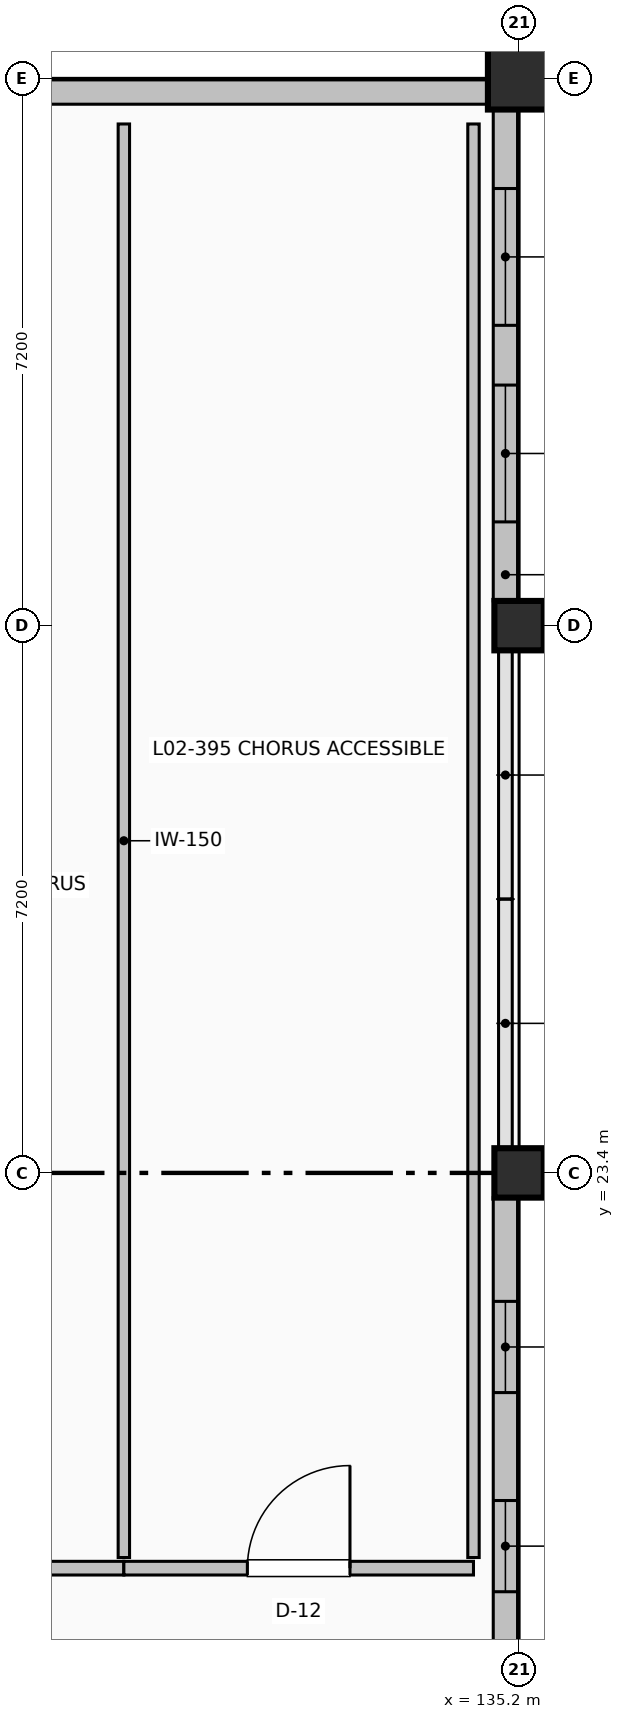
"""IFC4 building model, lengths in metres.
Left out: names, types, materials, properties, quantities, classifications, styles, units other than length and angle.
Written with IfcOpenShell. Run it as: python <this file> out.ifc"""

import sys

from ifc_helpers import new_model, si_unit, direction, frame, frame_2d, origin, origin_2d, place, context, subcontext, project, spatial, rectangle, extrude, element, fill, save


model = new_model("IFC4")
c1 = context("Model", 3, precision=1e-05, world=origin(), true_north=direction((0.0, 1.0)))
c2 = subcontext(c1, "Body", "Model", "MODEL_VIEW")
j1 = project(units=[si_unit("LENGTHUNIT", "METRE"), si_unit("PLANEANGLEUNIT", "RADIAN")], contexts=[c1])
p1 = place(None, origin())
s1 = spatial("IfcSite", under=j1, at=p1, CompositionType="ELEMENT")
p2 = place(p1, origin())
s2 = spatial("IfcBuilding", under=s1, at=p2, CompositionType="ELEMENT")
p3 = place(p2, frame((0.0, 0.0, 10.2)))
s3 = spatial("IfcBuildingStorey", under=s2, at=p3, CompositionType="ELEMENT", Elevation=10.2)
for number, where, z_axis, x_axis in (
    (1, (135.2, 23.4, 0.0), (0.0, 0.0, 1.0), (1.0, 0.0, 0.0)),
    (2, (135.2, 30.6, 0.0), (0.0, 0.0, 1.0), (1.0, 0.0, 0.0)),
):
    element("IfcColumn", number, at=place(p3, frame(where, z_axis=z_axis, x_axis=x_axis)), inside=s3, PredefinedType="COLUMN", context=c2, shape_type="SweptSolid", body=[
        extrude(rectangle(XDim=0.65, YDim=0.65, at=origin_2d()), origin(), (0.0, 0.0, 1.0), 4.8),
    ])
p4 = place(p3, frame((135.2, 37.8, 0.0), z_axis=(0.0, 0.0, 1.0), x_axis=(1.0, 0.0, 0.0)))
e3 = element("IfcColumn", 3, at=p4, inside=s3, PredefinedType="COLUMN", context=c2, shape_type="SweptSolid", body=[
    extrude(rectangle(XDim=0.82, YDim=0.82, at=origin_2d()), origin(), (0.0, 0.0, 1.0), 4.8),
])
p5 = place(p3, frame((135.02, 37.39, 0.0), z_axis=(0.0, 0.0, 1.0), x_axis=(0.0, -1.0, 0.0)))
e4 = element("IfcWall", 4, at=p5, inside=s3, PredefinedType="SOLIDWALL", context=c2, shape_type="SweptSolid", body=[
    extrude(rectangle(XDim=6.465, YDim=0.32, at=frame_2d((3.232, 0.0))), origin(), (0.0, 0.0, 1.0), 3.742),
])
p6 = place(p5, frame((1.039, 0.0, 1.0)))
e5 = element("IfcOpeningElement", 5, at=p6, cuts=e4, PredefinedType="OPENING", context=c2, shape_type="SweptSolid", body=[
    extrude(rectangle(XDim=1.8, YDim=1.7, at=frame_2d((0.9, 0.85))), frame((0.0, 0.17, 0.0), z_axis=(0.0, -1.0, 0.0), x_axis=(1.0, 0.0, 0.0)), (0.0, 0.0, 1.0), 0.34),
])
p7 = place(p5, frame((3.625, 0.0, 1.0)))
e6 = element("IfcOpeningElement", 6, at=p7, cuts=e4, PredefinedType="OPENING", context=c2, shape_type="SweptSolid", body=[
    extrude(rectangle(XDim=1.8, YDim=1.7, at=frame_2d((0.9, 0.85))), frame((0.0, 0.17, 0.0), z_axis=(0.0, -1.0, 0.0), x_axis=(1.0, 0.0, 0.0)), (0.0, 0.0, 1.0), 0.34),
])
p8 = place(p3, frame((135.02, 23.075, 0.0), z_axis=(0.0, 0.0, 1.0), x_axis=(0.0, -1.0, 0.0)))
e7 = element("IfcWall", 7, at=p8, inside=s3, PredefinedType="SOLIDWALL", context=c2, shape_type="SweptSolid", body=[
    extrude(rectangle(XDim=6.55, YDim=0.32, at=frame_2d((3.275, 0.0))), origin(), (0.0, 0.0, 1.0), 3.742),
])
p9 = place(p8, frame((1.365, 0.0, 1.0)))
e8 = element("IfcOpeningElement", 8, at=p9, cuts=e7, PredefinedType="OPENING", context=c2, shape_type="SweptSolid", body=[
    extrude(rectangle(XDim=1.2, YDim=1.7, at=frame_2d((0.6, 0.85))), frame((0.0, 0.17, 0.0), z_axis=(0.0, -1.0, 0.0), x_axis=(1.0, 0.0, 0.0)), (0.0, 0.0, 1.0), 0.34),
])
p10 = place(p8, frame((3.985, 0.0, 1.0)))
e9 = element("IfcOpeningElement", 9, at=p10, cuts=e7, PredefinedType="OPENING", context=c2, shape_type="SweptSolid", body=[
    extrude(rectangle(XDim=1.2, YDim=1.7, at=frame_2d((0.6, 0.85))), frame((0.0, 0.17, 0.0), z_axis=(0.0, -1.0, 0.0), x_axis=(1.0, 0.0, 0.0)), (0.0, 0.0, 1.0), 0.34),
])
p11 = place(p3, frame((129.01, 37.62, 0.0), z_axis=(0.0, 0.0, 1.0), x_axis=(1.0, 0.0, 0.0)))
e10 = element("IfcWall", 10, at=p11, inside=s3, PredefinedType="SOLIDWALL", context=c2, shape_type="SweptSolid", body=[
    extrude(rectangle(XDim=5.78, YDim=0.32, at=frame_2d((2.89, 0.0))), origin(), (0.0, 0.0, 1.0), 3.742),
])
p12 = place(p3, frame((125.4, 18.2, 0.0), z_axis=(0.0, 0.0, 1.0), x_axis=(1.0, 0.0, 0.0)))
e11 = element("IfcWall", 11, at=p12, inside=s3, PredefinedType="PARTITIONING", context=c2, shape_type="SweptSolid", body=[
    extrude(rectangle(XDim=4.6, YDim=0.18, at=frame_2d((2.3, 0.0))), origin(), (0.0, 0.0, 1.0), 4.492),
])
p13 = place(p12, frame((1.7, 0.0, 0.0)))
e12 = element("IfcOpeningElement", 12, at=p13, cuts=e11, PredefinedType="OPENING", context=c2, shape_type="SweptSolid", body=[
    extrude(rectangle(XDim=1.2, YDim=2.1, at=frame_2d((0.6, 1.05))), frame((0.0, 0.1, 0.0), z_axis=(0.0, -1.0, 0.0), x_axis=(1.0, 0.0, 0.0)), (0.0, 0.0, 1.0), 0.2),
])
for number, where, z_axis, x_axis in (
    (13, (130.0, 18.34, 0.0), (0.0, 0.0, 1.0), (0.0, 1.0, 0.0)),
    (14, (134.6, 18.34, 0.0), (0.0, 0.0, 1.0), (0.0, 1.0, 0.0)),
):
    element("IfcWall", number, at=place(p3, frame(where, z_axis=z_axis, x_axis=x_axis)), inside=s3, PredefinedType="PARTITIONING", context=c2, shape_type="SweptSolid", body=[
        extrude(rectangle(XDim=18.86, YDim=0.15, at=frame_2d((9.43, 0.0))), origin(), (0.0, 0.0, 1.0), 4.492),
    ])
p14 = place(p3, frame((130.0, 18.2, 0.0), z_axis=(0.0, 0.0, 1.0), x_axis=(1.0, 0.0, 0.0)))
e15 = element("IfcWall", 15, at=p14, inside=s3, PredefinedType="PARTITIONING", context=c2, shape_type="SweptSolid", body=[
    extrude(rectangle(XDim=4.6, YDim=0.18, at=frame_2d((2.3, 0.0))), origin(), (0.0, 0.0, 1.0), 4.492),
])
p15 = place(p14, frame((1.625, 0.0, 0.0)))
e16 = element("IfcOpeningElement", 16, at=p15, cuts=e15, PredefinedType="OPENING", context=c2, shape_type="SweptSolid", body=[
    extrude(rectangle(XDim=1.35, YDim=2.16, at=frame_2d((0.675, 1.08))), frame((0.0, 0.1, 0.0), z_axis=(0.0, -1.0, 0.0), x_axis=(1.0, 0.0, 0.0)), (0.0, 0.0, 1.0), 0.2),
])
p16 = place(p6, origin())
e17 = element("IfcWindow", 17, at=p16, inside=s3, PartitioningType="SINGLE_PANEL", PredefinedType="WINDOW", context=c2, shape_type="SweptSolid", body=[
    extrude(rectangle(XDim=1.8, YDim=1.7, at=frame_2d((0.9, 0.85))), frame((0.0, 0.03, 0.0), z_axis=(0.0, -1.0, 0.0), x_axis=(1.0, 0.0, 0.0)), (0.0, 0.0, 1.0), 0.06),
])
fill(e5, e17)
p17 = place(p7, origin())
e18 = element("IfcWindow", 18, at=p17, inside=s3, PartitioningType="SINGLE_PANEL", PredefinedType="WINDOW", context=c2, shape_type="SweptSolid", body=[
    extrude(rectangle(XDim=1.8, YDim=1.7, at=frame_2d((0.9, 0.85))), frame((0.0, 0.03, 0.0), z_axis=(0.0, -1.0, 0.0), x_axis=(1.0, 0.0, 0.0)), (0.0, 0.0, 1.0), 0.06),
])
fill(e6, e18)
p18 = place(p9, origin())
e19 = element("IfcWindow", 19, at=p18, inside=s3, PartitioningType="SINGLE_PANEL", PredefinedType="WINDOW", context=c2, shape_type="SweptSolid", body=[
    extrude(rectangle(XDim=1.2, YDim=1.7, at=frame_2d((0.6, 0.85))), frame((0.0, 0.03, 0.0), z_axis=(0.0, -1.0, 0.0), x_axis=(1.0, 0.0, 0.0)), (0.0, 0.0, 1.0), 0.06),
])
fill(e8, e19)
p19 = place(p10, origin())
e20 = element("IfcWindow", 20, at=p19, inside=s3, PartitioningType="SINGLE_PANEL", PredefinedType="WINDOW", context=c2, shape_type="SweptSolid", body=[
    extrude(rectangle(XDim=1.2, YDim=1.7, at=frame_2d((0.6, 0.85))), frame((0.0, 0.03, 0.0), z_axis=(0.0, -1.0, 0.0), x_axis=(1.0, 0.0, 0.0)), (0.0, 0.0, 1.0), 0.06),
])
fill(e9, e20)
p20 = place(p15, origin())
e21 = element("IfcDoor", 21, at=p20, inside=s3, OperationType="SINGLE_SWING_RIGHT", PredefinedType="DOOR", context=c2, shape_type="SweptSolid", body=[
    extrude(rectangle(XDim=1.35, YDim=2.16, at=frame_2d((0.675, 1.08))), frame((0.0, 0.025, 0.0), z_axis=(0.0, -1.0, 0.0), x_axis=(1.0, 0.0, 0.0)), (0.0, 0.0, 1.0), 0.05),
])
fill(e16, e21)
save(model, sys.argv[1])
